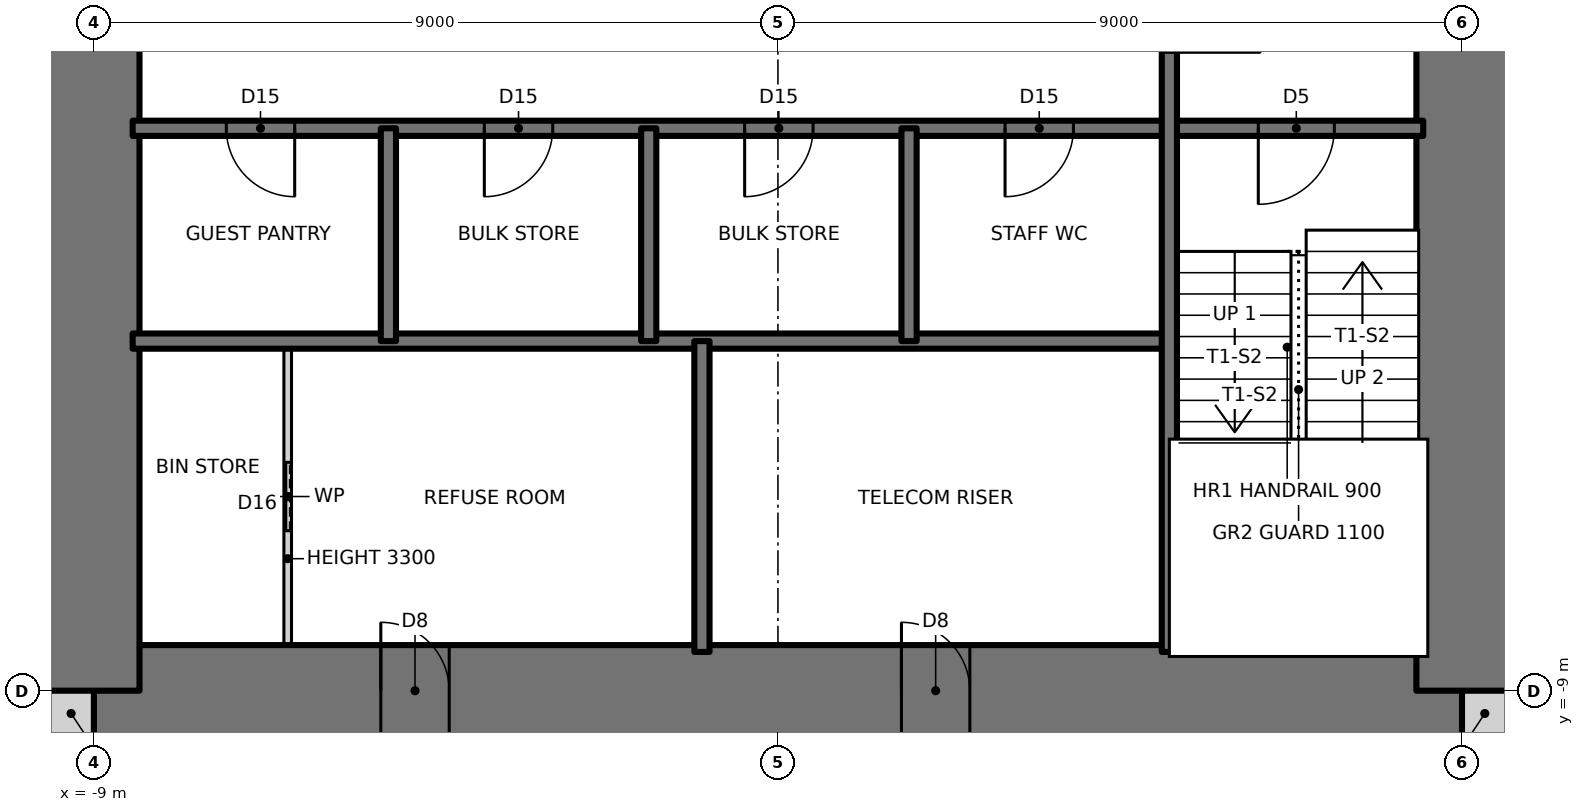
"""IFC4 building model, lengths in metres.
Left out: names, types, materials, properties, quantities, classifications, styles, units other than length and angle.
Written with IfcOpenShell. Run it as: python <this file> out.ifc"""

import sys

from ifc_helpers import new_model, si_unit, direction, frame, frame_2d, origin, place, context, subcontext, project, spatial, rectangle, extrude, element, fill, save


model = new_model("IFC4")
c1 = context("Model", 3, precision=1e-05, world=origin(), true_north=direction((0.0, 1.0)))
c2 = subcontext(c1, "Body", "Model", "MODEL_VIEW")
j1 = project(units=[si_unit("LENGTHUNIT", "METRE"), si_unit("PLANEANGLEUNIT", "RADIAN")], contexts=[c1])
p1 = place(None, origin())
s1 = spatial("IfcSite", under=j1, at=p1, CompositionType="ELEMENT")
p2 = place(p1, origin())
s2 = spatial("IfcBuilding", under=s1, at=p2, CompositionType="ELEMENT")
p3 = place(p2, frame((0.0, 0.0, 225.5)))
s3 = spatial("IfcBuildingStorey", under=s2, at=p3, CompositionType="ELEMENT", Elevation=225.5)
for number, where, z_axis, x_axis in (
    (1, (-9.6, -9.3, 0.0), (0.0, 0.0, 1.0), (1.0, 0.0, 0.0)),
    (2, (9.0, -9.3, 0.0), (0.0, 0.0, 1.0), (1.0, 0.0, 0.0)),
):
    element("IfcWall", number, at=place(p3, frame(where, z_axis=z_axis, x_axis=x_axis)), inside=s3, PredefinedType="SOLIDWALL", context=c2, shape_type="SweptSolid", body=[
        extrude(rectangle(XDim=0.6, YDim=0.6, at=frame_2d((0.3, 0.0))), origin(), (0.0, 0.0, 1.0), 3.5),
    ])
p4 = place(p3, frame((-9.0, -9.0, 0.0), z_axis=(0.0, 0.0, 1.0), x_axis=(1.0, 0.0, 0.0)))
e3 = element("IfcWall", 3, at=p4, inside=s3, PredefinedType="SHEAR", context=c2, shape_type="SweptSolid", body=[
    extrude(rectangle(XDim=18.0, YDim=1.2, at=frame_2d((9.0, 0.0))), origin(), (0.0, 0.0, 1.0), 3.5),
])
p5 = place(p4, frame((3.775, 0.0, 0.0)))
e4 = element("IfcOpeningElement", 4, at=p5, cuts=e3, PredefinedType="OPENING", context=c2, shape_type="SweptSolid", body=[
    extrude(rectangle(XDim=0.9, YDim=2.1, at=frame_2d((0.45, 1.05))), frame((0.0, 0.61, 0.0), z_axis=(0.0, -1.0, 0.0), x_axis=(1.0, 0.0, 0.0)), (0.0, 0.0, 1.0), 1.22),
])
p6 = place(p4, frame((10.625, 0.0, 0.0)))
e5 = element("IfcOpeningElement", 5, at=p6, cuts=e3, PredefinedType="OPENING", context=c2, shape_type="SweptSolid", body=[
    extrude(rectangle(XDim=0.9, YDim=2.1, at=frame_2d((0.45, 1.05))), frame((0.0, 0.61, 0.0), z_axis=(0.0, -1.0, 0.0), x_axis=(1.0, 0.0, 0.0)), (0.0, 0.0, 1.0), 1.22),
])
p7 = place(p3, frame((9.0, -9.0, 0.0), z_axis=(0.0, 0.0, 1.0), x_axis=(0.0, 1.0, 0.0)))
e6 = element("IfcWall", 6, at=p7, inside=s3, PredefinedType="SHEAR", context=c2, shape_type="SweptSolid", body=[
    extrude(rectangle(XDim=18.0, YDim=1.2, at=frame_2d((9.0, 0.0))), origin(), (0.0, 0.0, 1.0), 3.5),
])
p8 = place(p7, frame((8.5, 0.0, 0.0)))
e7 = element("IfcOpeningElement", 7, at=p8, cuts=e6, PredefinedType="OPENING", context=c2, shape_type="SweptSolid", body=[
    extrude(rectangle(XDim=1.0, YDim=2.1, at=frame_2d((0.5, 1.05))), frame((0.0, 0.61, 0.0), z_axis=(0.0, -1.0, 0.0), x_axis=(1.0, 0.0, 0.0)), (0.0, 0.0, 1.0), 1.22),
])
p9 = place(p3, frame((-9.0, 9.0, 0.0), z_axis=(0.0, 0.0, 1.0), x_axis=(0.0, -1.0, 0.0)))
e8 = element("IfcWall", 8, at=p9, inside=s3, PredefinedType="SHEAR", context=c2, shape_type="SweptSolid", body=[
    extrude(rectangle(XDim=18.0, YDim=1.2, at=frame_2d((9.0, 0.0))), origin(), (0.0, 0.0, 1.0), 3.5),
])
p10 = place(p9, frame((8.5, 0.0, 0.0)))
e9 = element("IfcOpeningElement", 9, at=p10, cuts=e8, PredefinedType="OPENING", context=c2, shape_type="SweptSolid", body=[
    extrude(rectangle(XDim=1.0, YDim=2.1, at=frame_2d((0.5, 1.05))), frame((0.0, 0.61, 0.0), z_axis=(0.0, -1.0, 0.0), x_axis=(1.0, 0.0, 0.0)), (0.0, 0.0, 1.0), 1.22),
])
p11 = place(p3, frame((-8.49, -4.4, 0.0), z_axis=(0.0, 0.0, 1.0), x_axis=(1.0, 0.0, 0.0)))
e10 = element("IfcWall", 10, at=p11, inside=s3, PredefinedType="SOLIDWALL", context=c2, shape_type="SweptSolid", body=[
    extrude(rectangle(XDim=13.64, YDim=0.2, at=frame_2d((6.82, 0.0))), origin(), (0.0, 0.0, 1.0), 3.5),
])
p12 = place(p3, frame((-8.49, -1.6, 0.0), z_axis=(0.0, 0.0, 1.0), x_axis=(1.0, 0.0, 0.0)))
e11 = element("IfcWall", 11, at=p12, inside=s3, PredefinedType="SOLIDWALL", context=c2, shape_type="SweptSolid", body=[
    extrude(rectangle(XDim=16.98, YDim=0.2, at=frame_2d((8.49, 0.0))), origin(), (0.0, 0.0, 1.0), 3.5),
])
p13 = place(p12, frame((14.81, 0.0, 0.0)))
e12 = element("IfcOpeningElement", 12, at=p13, cuts=e11, PredefinedType="OPENING", context=c2, shape_type="SweptSolid", body=[
    extrude(rectangle(XDim=1.0, YDim=2.1, at=frame_2d((0.5, 1.05))), frame((0.0, 0.11, 0.0), z_axis=(0.0, -1.0, 0.0), x_axis=(1.0, 0.0, 0.0)), (0.0, 0.0, 1.0), 0.22),
])
p14 = place(p12, frame((1.232, 0.0, 0.0)))
e13 = element("IfcOpeningElement", 13, at=p14, cuts=e11, PredefinedType="OPENING", context=c2, shape_type="SweptSolid", body=[
    extrude(rectangle(XDim=0.9, YDim=2.1, at=frame_2d((0.45, 1.05))), frame((0.0, 0.11, 0.0), z_axis=(0.0, -1.0, 0.0), x_axis=(1.0, 0.0, 0.0)), (0.0, 0.0, 1.0), 0.22),
])
p15 = place(p12, frame((4.627, 0.0, 0.0)))
e14 = element("IfcOpeningElement", 14, at=p15, cuts=e11, PredefinedType="OPENING", context=c2, shape_type="SweptSolid", body=[
    extrude(rectangle(XDim=0.9, YDim=2.1, at=frame_2d((0.45, 1.05))), frame((0.0, 0.11, 0.0), z_axis=(0.0, -1.0, 0.0), x_axis=(1.0, 0.0, 0.0)), (0.0, 0.0, 1.0), 0.22),
])
p16 = place(p12, frame((8.052, 0.0, 0.0)))
e15 = element("IfcOpeningElement", 15, at=p16, cuts=e11, PredefinedType="OPENING", context=c2, shape_type="SweptSolid", body=[
    extrude(rectangle(XDim=0.9, YDim=2.1, at=frame_2d((0.45, 1.05))), frame((0.0, 0.11, 0.0), z_axis=(0.0, -1.0, 0.0), x_axis=(1.0, 0.0, 0.0)), (0.0, 0.0, 1.0), 0.22),
])
p17 = place(p12, frame((11.478, 0.0, 0.0)))
e16 = element("IfcOpeningElement", 16, at=p17, cuts=e11, PredefinedType="OPENING", context=c2, shape_type="SweptSolid", body=[
    extrude(rectangle(XDim=0.9, YDim=2.1, at=frame_2d((0.45, 1.05))), frame((0.0, 0.11, 0.0), z_axis=(0.0, -1.0, 0.0), x_axis=(1.0, 0.0, 0.0)), (0.0, 0.0, 1.0), 0.22),
])
p18 = place(p3, frame((5.15, -8.49, 0.0), z_axis=(0.0, 0.0, 1.0), x_axis=(0.0, 1.0, 0.0)))
e17 = element("IfcWall", 17, at=p18, inside=s3, PredefinedType="SOLIDWALL", context=c2, shape_type="SweptSolid", body=[
    extrude(rectangle(XDim=13.09, YDim=0.2, at=frame_2d((6.545, 0.0))), origin(), (0.0, 0.0, 1.0), 3.5),
])
p19 = place(p18, frame((7.89, 0.0, 0.0)))
e18 = element("IfcOpeningElement", 18, at=p19, cuts=e17, PredefinedType="OPENING", context=c2, shape_type="SweptSolid", body=[
    extrude(rectangle(XDim=1.2, YDim=2.1, at=frame_2d((0.6, 1.05))), frame((0.0, 0.11, 0.0), z_axis=(0.0, -1.0, 0.0), x_axis=(1.0, 0.0, 0.0)), (0.0, 0.0, 1.0), 0.22),
])
p20 = place(p3, frame((1.725, -4.4, 0.0), z_axis=(0.0, 0.0, 1.0), x_axis=(0.0, 1.0, 0.0)))
e19 = element("IfcWall", 19, at=p20, inside=s3, PredefinedType="SOLIDWALL", context=c2, shape_type="SweptSolid", body=[
    extrude(rectangle(XDim=2.8, YDim=0.2, at=frame_2d((1.4, 0.0))), origin(), (0.0, 0.0, 1.0), 3.5),
])
p21 = place(p3, frame((-1.0, -8.49, 0.0), z_axis=(0.0, 0.0, 1.0), x_axis=(0.0, 1.0, 0.0)))
e20 = element("IfcWall", 20, at=p21, inside=s3, PredefinedType="SOLIDWALL", context=c2, shape_type="SweptSolid", body=[
    extrude(rectangle(XDim=4.09, YDim=0.2, at=frame_2d((2.045, 0.0))), origin(), (0.0, 0.0, 1.0), 3.5),
])
for number, where, z_axis, x_axis in (
    (21, (-1.7, -4.4, 0.0), (0.0, 0.0, 1.0), (0.0, 1.0, 0.0)),
    (22, (-5.125, -4.4, 0.0), (0.0, 0.0, 1.0), (0.0, 1.0, 0.0)),
):
    element("IfcWall", number, at=place(p3, frame(where, z_axis=z_axis, x_axis=x_axis)), inside=s3, PredefinedType="SOLIDWALL", context=c2, shape_type="SweptSolid", body=[
        extrude(rectangle(XDim=2.8, YDim=0.2, at=frame_2d((1.4, 0.0))), origin(), (0.0, 0.0, 1.0), 3.5),
    ])
p22 = place(p3, frame((-6.45, -8.49, 0.0), z_axis=(0.0, 0.0, 1.0), x_axis=(0.0, 1.0, 0.0)))
e23 = element("IfcWall", 23, at=p22, inside=s3, PredefinedType="PARTITIONING", context=c2, shape_type="SweptSolid", body=[
    extrude(rectangle(XDim=4.09, YDim=0.1, at=frame_2d((2.045, 0.0))), origin(), (0.0, 0.0, 1.0), 3.3),
])
p23 = place(p22, frame((1.595, 0.0, 0.0)))
e24 = element("IfcOpeningElement", 24, at=p23, cuts=e23, PredefinedType="OPENING", context=c2, shape_type="SweptSolid", body=[
    extrude(rectangle(XDim=0.9, YDim=2.1, at=frame_2d((0.45, 1.05))), frame((0.0, 0.06, 0.0), z_axis=(0.0, -1.0, 0.0), x_axis=(1.0, 0.0, 0.0)), (0.0, 0.0, 1.0), 0.12),
])
p24 = place(p13, frame((1.0, 0.0, 0.0), z_axis=(0.0, 0.0, 1.0), x_axis=(-1.0, 0.0, 0.0)))
e25 = element("IfcDoor", 25, at=p24, inside=s3, OperationType="SINGLE_SWING_RIGHT", PredefinedType="DOOR", context=c2, shape_type="SweptSolid", body=[
    extrude(rectangle(XDim=1.0, YDim=2.1, at=frame_2d((0.5, 1.05))), frame((0.0, 0.025, 0.0), z_axis=(0.0, -1.0, 0.0), x_axis=(1.0, 0.0, 0.0)), (0.0, 0.0, 1.0), 0.05),
])
fill(e12, e25)
p25 = place(p19, frame((1.2, 0.0, 0.0), z_axis=(0.0, 0.0, 1.0), x_axis=(-1.0, 0.0, 0.0)))
e26 = element("IfcDoor", 26, at=p25, inside=s3, OperationType="SINGLE_SWING_RIGHT", PredefinedType="DOOR", context=c2, shape_type="SweptSolid", body=[
    extrude(rectangle(XDim=1.2, YDim=2.1, at=frame_2d((0.6, 1.05))), frame((0.0, 0.025, 0.0), z_axis=(0.0, -1.0, 0.0), x_axis=(1.0, 0.0, 0.0)), (0.0, 0.0, 1.0), 0.05),
])
fill(e18, e26)
p26 = place(p14, frame((0.9, 0.0, 0.0), z_axis=(0.0, 0.0, 1.0), x_axis=(-1.0, 0.0, 0.0)))
e27 = element("IfcDoor", 27, at=p26, inside=s3, OperationType="SINGLE_SWING_LEFT", PredefinedType="DOOR", context=c2, shape_type="SweptSolid", body=[
    extrude(rectangle(XDim=0.9, YDim=2.1, at=frame_2d((0.45, 1.05))), frame((0.0, 0.025, 0.0), z_axis=(0.0, -1.0, 0.0), x_axis=(1.0, 0.0, 0.0)), (0.0, 0.0, 1.0), 0.05),
])
fill(e13, e27)
p27 = place(p15, frame((0.9, 0.0, 0.0), z_axis=(0.0, 0.0, 1.0), x_axis=(-1.0, 0.0, 0.0)))
e28 = element("IfcDoor", 28, at=p27, inside=s3, OperationType="SINGLE_SWING_RIGHT", PredefinedType="DOOR", context=c2, shape_type="SweptSolid", body=[
    extrude(rectangle(XDim=0.9, YDim=2.1, at=frame_2d((0.45, 1.05))), frame((0.0, 0.025, 0.0), z_axis=(0.0, -1.0, 0.0), x_axis=(1.0, 0.0, 0.0)), (0.0, 0.0, 1.0), 0.05),
])
fill(e14, e28)
p28 = place(p16, frame((0.9, 0.0, 0.0), z_axis=(0.0, 0.0, 1.0), x_axis=(-1.0, 0.0, 0.0)))
e29 = element("IfcDoor", 29, at=p28, inside=s3, OperationType="SINGLE_SWING_RIGHT", PredefinedType="DOOR", context=c2, shape_type="SweptSolid", body=[
    extrude(rectangle(XDim=0.9, YDim=2.1, at=frame_2d((0.45, 1.05))), frame((0.0, 0.025, 0.0), z_axis=(0.0, -1.0, 0.0), x_axis=(1.0, 0.0, 0.0)), (0.0, 0.0, 1.0), 0.05),
])
fill(e15, e29)
p29 = place(p17, frame((0.9, 0.0, 0.0), z_axis=(0.0, 0.0, 1.0), x_axis=(-1.0, 0.0, 0.0)))
e30 = element("IfcDoor", 30, at=p29, inside=s3, OperationType="SINGLE_SWING_RIGHT", PredefinedType="DOOR", context=c2, shape_type="SweptSolid", body=[
    extrude(rectangle(XDim=0.9, YDim=2.1, at=frame_2d((0.45, 1.05))), frame((0.0, 0.025, 0.0), z_axis=(0.0, -1.0, 0.0), x_axis=(1.0, 0.0, 0.0)), (0.0, 0.0, 1.0), 0.05),
])
fill(e16, e30)
p30 = place(p23, origin())
e31 = element("IfcDoor", 31, at=p30, inside=s3, OperationType="SLIDING_TO_LEFT", PredefinedType="DOOR", context=c2, shape_type="SweptSolid", body=[
    extrude(rectangle(XDim=0.9, YDim=2.1, at=frame_2d((0.45, 1.05))), frame((0.0, 0.025, 0.0), z_axis=(0.0, -1.0, 0.0), x_axis=(1.0, 0.0, 0.0)), (0.0, 0.0, 1.0), 0.05),
])
fill(e24, e31)
p31 = place(p5, origin())
e32 = element("IfcDoor", 32, at=p31, inside=s3, OperationType="SINGLE_SWING_LEFT", PredefinedType="DOOR", context=c2, shape_type="SweptSolid", body=[
    extrude(rectangle(XDim=0.9, YDim=2.1, at=frame_2d((0.45, 1.05))), frame((0.0, 0.025, 0.0), z_axis=(0.0, -1.0, 0.0), x_axis=(1.0, 0.0, 0.0)), (0.0, 0.0, 1.0), 0.05),
])
fill(e4, e32)
p32 = place(p6, origin())
e33 = element("IfcDoor", 33, at=p32, inside=s3, OperationType="SINGLE_SWING_LEFT", PredefinedType="DOOR", context=c2, shape_type="SweptSolid", body=[
    extrude(rectangle(XDim=0.9, YDim=2.1, at=frame_2d((0.45, 1.05))), frame((0.0, 0.025, 0.0), z_axis=(0.0, -1.0, 0.0), x_axis=(1.0, 0.0, 0.0)), (0.0, 0.0, 1.0), 0.05),
])
fill(e5, e33)
save(model, sys.argv[1])
